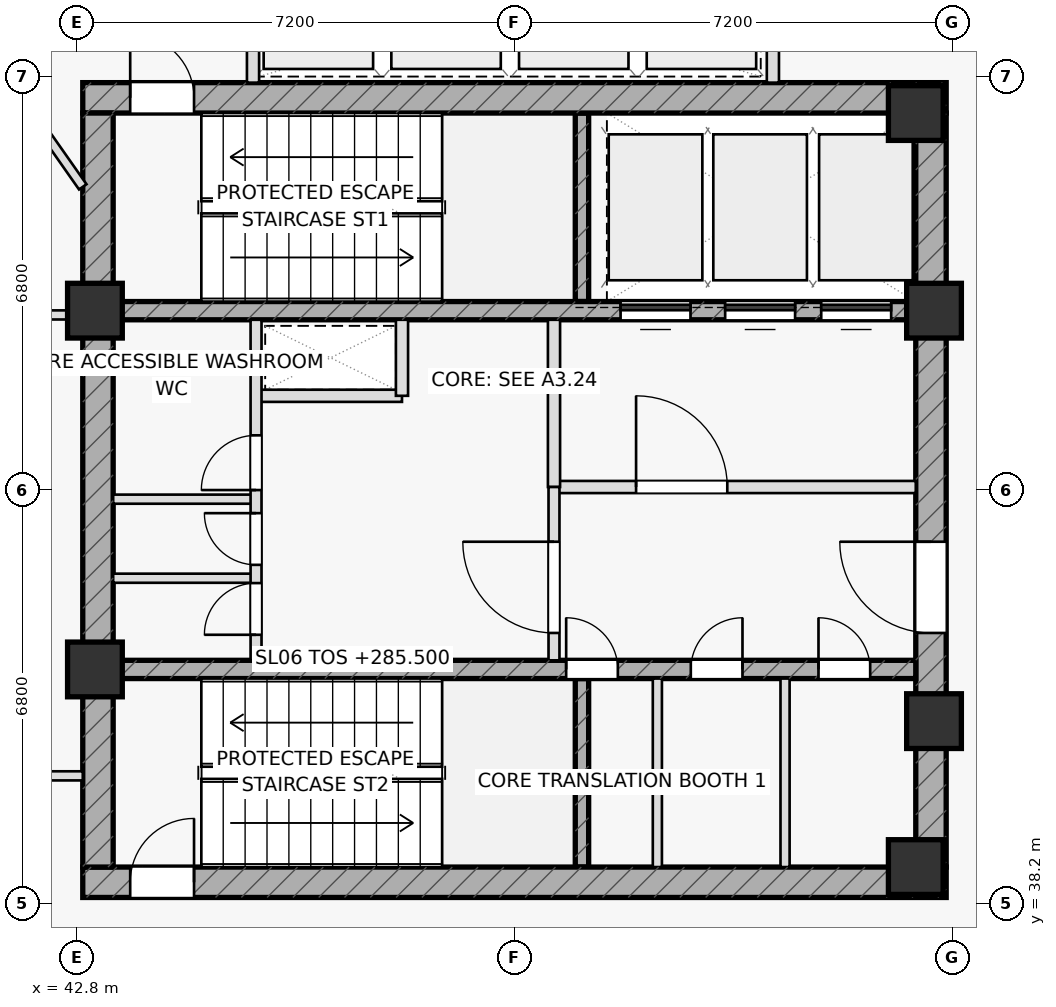
"""IFC4 building model, lengths in metres.
Left out: names, types, materials, properties, quantities, classifications, styles, units other than length and angle.
Written with IfcOpenShell. Run it as: python <this file> out.ifc"""

import sys

from ifc_helpers import new_model, si_unit, direction, frame, frame_2d, origin, origin_2d, place, context, subcontext, project, spatial, rectangle, extrude, element, fill, save


model = new_model("IFC4")
c1 = context("Model", 3, precision=1e-05, world=origin(), true_north=direction((0.0, 1.0)))
c2 = subcontext(c1, "Body", "Model", "MODEL_VIEW")
j1 = project(units=[si_unit("LENGTHUNIT", "METRE"), si_unit("PLANEANGLEUNIT", "RADIAN")], contexts=[c1])
p1 = place(None, origin())
s1 = spatial("IfcSite", under=j1, at=p1, CompositionType="ELEMENT")
p2 = place(p1, origin())
s2 = spatial("IfcBuilding", under=s1, at=p2, CompositionType="ELEMENT")
p3 = place(p2, frame((0.0, 0.0, 285.5)))
s3 = spatial("IfcBuildingStorey", under=s2, at=p3, CompositionType="ELEMENT", Elevation=285.5)
for number, where, z_axis, x_axis in (
    (1, (51.11, 48.1, 0.0), (0.0, 0.0, 1.0), (0.0, 1.0, 0.0)),
    (2, (51.11, 38.8, 0.0), (0.0, 0.0, 1.0), (0.0, 1.0, 0.0)),
):
    element("IfcWall", number, at=place(p3, frame(where, z_axis=z_axis, x_axis=x_axis)), inside=s3, PredefinedType="SHEAR", context=c2, shape_type="SweptSolid", body=[
        extrude(rectangle(XDim=3.1, YDim=0.22, at=frame_2d((1.55, 0.0))), origin(), (0.0, 0.0, 1.0), 3.7),
    ])
p4 = place(p3, frame((42.9, 51.45, 0.0), z_axis=(0.0, 0.0, 1.0), x_axis=(1.0, 0.0, 0.0)))
e3 = element("IfcWall", 3, at=p4, inside=s3, PredefinedType="SHEAR", context=c2, shape_type="SweptSolid", body=[
    extrude(rectangle(XDim=14.2, YDim=0.5, at=frame_2d((7.1, 0.0))), origin(), (0.0, 0.0, 1.0), 3.7),
])
p5 = place(p4, frame((0.78, 0.0, 0.0)))
e4 = element("IfcOpeningElement", 4, at=p5, cuts=e3, PredefinedType="OPENING", context=c2, shape_type="SweptSolid", body=[
    extrude(rectangle(XDim=1.05, YDim=2.2, at=frame_2d((0.525, 1.1))), frame((0.0, 0.26, 0.0), z_axis=(0.0, -1.0, 0.0), x_axis=(1.0, 0.0, 0.0)), (0.0, 0.0, 1.0), 0.52),
])
p6 = place(p3, frame((42.9, 38.55, 0.0), z_axis=(0.0, 0.0, 1.0), x_axis=(1.0, 0.0, 0.0)))
e5 = element("IfcWall", 5, at=p6, inside=s3, PredefinedType="SHEAR", context=c2, shape_type="SweptSolid", body=[
    extrude(rectangle(XDim=14.2, YDim=0.5, at=frame_2d((7.1, 0.0))), origin(), (0.0, 0.0, 1.0), 3.7),
])
p7 = place(p6, frame((0.78, 0.0, 0.0)))
e6 = element("IfcOpeningElement", 6, at=p7, cuts=e5, PredefinedType="OPENING", context=c2, shape_type="SweptSolid", body=[
    extrude(rectangle(XDim=1.05, YDim=2.2, at=frame_2d((0.525, 1.1))), frame((0.0, 0.26, 0.0), z_axis=(0.0, -1.0, 0.0), x_axis=(1.0, 0.0, 0.0)), (0.0, 0.0, 1.0), 0.52),
])
p8 = place(p3, frame((43.15, 38.8, 0.0), z_axis=(0.0, 0.0, 1.0), x_axis=(0.0, 1.0, 0.0)))
e7 = element("IfcWall", 7, at=p8, inside=s3, PredefinedType="SHEAR", context=c2, shape_type="SweptSolid", body=[
    extrude(rectangle(XDim=12.4, YDim=0.5, at=frame_2d((6.2, 0.0))), origin(), (0.0, 0.0, 1.0), 3.7),
])
p9 = place(p3, frame((56.85, 38.8, 0.0), z_axis=(0.0, 0.0, 1.0), x_axis=(0.0, 1.0, 0.0)))
e8 = element("IfcWall", 8, at=p9, inside=s3, PredefinedType="SHEAR", context=c2, shape_type="SweptSolid", body=[
    extrude(rectangle(XDim=12.4, YDim=0.5, at=frame_2d((6.2, 0.0))), origin(), (0.0, 0.0, 1.0), 3.7),
])
p10 = place(p9, frame((3.85, 0.0, 0.0)))
e9 = element("IfcOpeningElement", 9, at=p10, cuts=e8, PredefinedType="OPENING", context=c2, shape_type="SweptSolid", body=[
    extrude(rectangle(XDim=1.5, YDim=2.2, at=frame_2d((0.75, 1.1))), frame((0.0, 0.26, 0.0), z_axis=(0.0, -1.0, 0.0), x_axis=(1.0, 0.0, 0.0)), (0.0, 0.0, 1.0), 0.52),
])
p11 = place(p3, frame((43.4, 47.95, 0.0), z_axis=(0.0, 0.0, 1.0), x_axis=(1.0, 0.0, 0.0)))
e10 = element("IfcWall", 10, at=p11, inside=s3, PredefinedType="SHEAR", context=c2, shape_type="SweptSolid", body=[
    extrude(rectangle(XDim=13.2, YDim=0.3, at=frame_2d((6.6, 0.0))), origin(), (0.0, 0.0, 1.0), 3.7),
])
p12 = place(p11, frame((8.345, 0.0, 0.0)))
e11 = element("IfcOpeningElement", 11, at=p12, cuts=e10, PredefinedType="OPENING", context=c2, shape_type="SweptSolid", body=[
    extrude(rectangle(XDim=1.15, YDim=2.2, at=frame_2d((0.575, 1.1))), frame((0.0, 0.16, 0.0), z_axis=(0.0, -1.0, 0.0), x_axis=(1.0, 0.0, 0.0)), (0.0, 0.0, 1.0), 0.32),
])
p13 = place(p11, frame((10.065, 0.0, 0.0)))
e12 = element("IfcOpeningElement", 12, at=p13, cuts=e10, PredefinedType="OPENING", context=c2, shape_type="SweptSolid", body=[
    extrude(rectangle(XDim=1.15, YDim=2.2, at=frame_2d((0.575, 1.1))), frame((0.0, 0.16, 0.0), z_axis=(0.0, -1.0, 0.0), x_axis=(1.0, 0.0, 0.0)), (0.0, 0.0, 1.0), 0.32),
])
p14 = place(p11, frame((11.645, 0.0, 0.0)))
e13 = element("IfcOpeningElement", 13, at=p14, cuts=e10, PredefinedType="OPENING", context=c2, shape_type="SweptSolid", body=[
    extrude(rectangle(XDim=1.15, YDim=2.2, at=frame_2d((0.575, 1.1))), frame((0.0, 0.16, 0.0), z_axis=(0.0, -1.0, 0.0), x_axis=(1.0, 0.0, 0.0)), (0.0, 0.0, 1.0), 0.32),
])
p15 = place(p3, frame((43.4, 42.05, 0.0), z_axis=(0.0, 0.0, 1.0), x_axis=(1.0, 0.0, 0.0)))
e14 = element("IfcWall", 14, at=p15, inside=s3, PredefinedType="SHEAR", context=c2, shape_type="SweptSolid", body=[
    extrude(rectangle(XDim=13.2, YDim=0.3, at=frame_2d((6.6, 0.0))), origin(), (0.0, 0.0, 1.0), 3.7),
])
p16 = place(p15, frame((7.45, 0.0, 0.0)))
e15 = element("IfcOpeningElement", 15, at=p16, cuts=e14, PredefinedType="OPENING", context=c2, shape_type="SweptSolid", body=[
    extrude(rectangle(XDim=0.85, YDim=2.05, at=frame_2d((0.425, 1.025))), frame((0.0, 0.16, 0.0), z_axis=(0.0, -1.0, 0.0), x_axis=(1.0, 0.0, 0.0)), (0.0, 0.0, 1.0), 0.32),
])
p17 = place(p15, frame((9.5, 0.0, 0.0)))
e16 = element("IfcOpeningElement", 16, at=p17, cuts=e14, PredefinedType="OPENING", context=c2, shape_type="SweptSolid", body=[
    extrude(rectangle(XDim=0.85, YDim=2.05, at=frame_2d((0.425, 1.025))), frame((0.0, 0.16, 0.0), z_axis=(0.0, -1.0, 0.0), x_axis=(1.0, 0.0, 0.0)), (0.0, 0.0, 1.0), 0.32),
])
p18 = place(p15, frame((11.6, 0.0, 0.0)))
e17 = element("IfcOpeningElement", 17, at=p18, cuts=e14, PredefinedType="OPENING", context=c2, shape_type="SweptSolid", body=[
    extrude(rectangle(XDim=0.85, YDim=2.05, at=frame_2d((0.425, 1.025))), frame((0.0, 0.16, 0.0), z_axis=(0.0, -1.0, 0.0), x_axis=(1.0, 0.0, 0.0)), (0.0, 0.0, 1.0), 0.32),
])
for number, where, z_axis, x_axis in (
    (18, (43.1, 47.95, 0.0), (0.0, 0.0, 1.0), (1.0, 0.0, 0.0)),
    (19, (56.9, 47.95, 0.0), (0.0, 0.0, 1.0), (1.0, 0.0, 0.0)),
    (20, (56.6, 51.2, 0.0), (0.0, 0.0, 1.0), (1.0, 0.0, 0.0)),
    (21, (43.1, 42.05, 0.0), (0.0, 0.0, 1.0), (1.0, 0.0, 0.0)),
    (22, (56.9, 41.2, 0.0), (0.0, 0.0, 1.0), (1.0, 0.0, 0.0)),
    (23, (56.6, 38.8, 0.0), (0.0, 0.0, 1.0), (1.0, 0.0, 0.0)),
):
    element("IfcColumn", number, at=place(p3, frame(where, z_axis=z_axis, x_axis=x_axis)), inside=s3, PredefinedType="COLUMN", context=c2, shape_type="SweptSolid", body=[
        extrude(rectangle(XDim=0.9, YDim=0.9, at=origin_2d()), origin(), (0.0, 0.0, 1.0), 3.7),
    ])
for number, where, z_axis, x_axis in (
    (24, (45.7, 51.7, 0.0), (0.0, 0.0, 1.0), (0.0, 1.0, 0.0)),
    (25, (54.25, 51.7, 0.0), (0.0, 0.0, 1.0), (0.0, 1.0, 0.0)),
):
    element("IfcWall", number, at=place(p3, frame(where, z_axis=z_axis, x_axis=x_axis)), inside=s3, PredefinedType="PARTITIONING", context=c2, shape_type="SweptSolid", body=[
        extrude(rectangle(XDim=2.6, YDim=0.2, at=frame_2d((1.3, 0.0))), origin(), (0.0, 0.0, 1.0), 3.7),
    ])
p19 = place(p3, frame((45.75, 46.55, 0.0), z_axis=(0.0, 0.0, 1.0), x_axis=(1.0, 0.0, 0.0)))
e26 = element("IfcWall", 26, at=p19, inside=s3, PredefinedType="PARTITIONING", context=c2, shape_type="SweptSolid", body=[
    extrude(rectangle(XDim=2.4, YDim=0.2, at=frame_2d((1.2, 0.0))), origin(), (0.0, 0.0, 1.0), 3.7),
])
p20 = place(p3, frame((48.15, 46.55, 0.0), z_axis=(0.0, 0.0, 1.0), x_axis=(0.0, 1.0, 0.0)))
e27 = element("IfcWall", 27, at=p20, inside=s3, PredefinedType="PARTITIONING", context=c2, shape_type="SweptSolid", body=[
    extrude(rectangle(XDim=1.25, YDim=0.2, at=frame_2d((0.625, 0.0))), origin(), (0.0, 0.0, 1.0), 3.7),
])
p21 = place(p3, frame((50.65, 45.05, 0.0), z_axis=(0.0, 0.0, 1.0), x_axis=(1.0, 0.0, 0.0)))
e28 = element("IfcWall", 28, at=p21, inside=s3, PredefinedType="PARTITIONING", context=c2, shape_type="SweptSolid", body=[
    extrude(rectangle(XDim=5.95, YDim=0.2, at=frame_2d((2.975, 0.0))), origin(), (0.0, 0.0, 1.0), 3.7),
])
p22 = place(p21, frame((1.35, 0.0, 0.0)))
e29 = element("IfcOpeningElement", 29, at=p22, cuts=e28, PredefinedType="OPENING", context=c2, shape_type="SweptSolid", body=[
    extrude(rectangle(XDim=1.5, YDim=2.2, at=frame_2d((0.75, 1.1))), frame((0.0, 0.11, 0.0), z_axis=(0.0, -1.0, 0.0), x_axis=(1.0, 0.0, 0.0)), (0.0, 0.0, 1.0), 0.22),
])
p23 = place(p3, frame((50.65, 45.05, 0.0), z_axis=(0.0, 0.0, 1.0), x_axis=(0.0, 1.0, 0.0)))
e30 = element("IfcWall", 30, at=p23, inside=s3, PredefinedType="PARTITIONING", context=c2, shape_type="SweptSolid", body=[
    extrude(rectangle(XDim=2.75, YDim=0.2, at=frame_2d((1.375, 0.0))), origin(), (0.0, 0.0, 1.0), 3.7),
])
p24 = place(p3, frame((50.65, 42.2, 0.0), z_axis=(0.0, 0.0, 1.0), x_axis=(0.0, 1.0, 0.0)))
e31 = element("IfcWall", 31, at=p24, inside=s3, PredefinedType="PARTITIONING", context=c2, shape_type="SweptSolid", body=[
    extrude(rectangle(XDim=2.85, YDim=0.18, at=frame_2d((1.425, 0.0))), origin(), (0.0, 0.0, 1.0), 3.7),
])
p25 = place(p24, frame((0.45, 0.0, 0.0)))
e32 = element("IfcOpeningElement", 32, at=p25, cuts=e31, PredefinedType="OPENING", context=c2, shape_type="SweptSolid", body=[
    extrude(rectangle(XDim=1.5, YDim=2.2, at=frame_2d((0.75, 1.1))), frame((0.0, 0.1, 0.0), z_axis=(0.0, -1.0, 0.0), x_axis=(1.0, 0.0, 0.0)), (0.0, 0.0, 1.0), 0.2),
])
for number, where, z_axis, x_axis in (
    (33, (52.35, 38.8, 0.0), (0.0, 0.0, 1.0), (0.0, 1.0, 0.0)),
    (34, (54.45, 38.8, 0.0), (0.0, 0.0, 1.0), (0.0, 1.0, 0.0)),
):
    element("IfcWall", number, at=place(p3, frame(where, z_axis=z_axis, x_axis=x_axis)), inside=s3, PredefinedType="PARTITIONING", context=c2, shape_type="SweptSolid", body=[
        extrude(rectangle(XDim=3.1, YDim=0.15, at=frame_2d((1.55, 0.0))), origin(), (0.0, 0.0, 1.0), 3.7),
    ])
for number, where, z_axis, x_axis in (
    (35, (43.4, 43.55, 0.0), (0.0, 0.0, 1.0), (1.0, 0.0, 0.0)),
    (36, (43.4, 44.85, 0.0), (0.0, 0.0, 1.0), (1.0, 0.0, 0.0)),
):
    element("IfcWall", number, at=place(p3, frame(where, z_axis=z_axis, x_axis=x_axis)), inside=s3, PredefinedType="PARTITIONING", context=c2, shape_type="SweptSolid", body=[
        extrude(rectangle(XDim=2.35, YDim=0.15, at=frame_2d((1.175, 0.0))), origin(), (0.0, 0.0, 1.0), 3.7),
    ])
p26 = place(p3, frame((45.75, 42.2, 0.0), z_axis=(0.0, 0.0, 1.0), x_axis=(0.0, 1.0, 0.0)))
e37 = element("IfcWall", 37, at=p26, inside=s3, PredefinedType="PARTITIONING", context=c2, shape_type="SweptSolid", body=[
    extrude(rectangle(XDim=5.6, YDim=0.18, at=frame_2d((2.8, 0.0))), origin(), (0.0, 0.0, 1.0), 3.7),
])
p27 = place(p26, frame((0.42, 0.0, 0.0)))
e38 = element("IfcOpeningElement", 38, at=p27, cuts=e37, PredefinedType="OPENING", context=c2, shape_type="SweptSolid", body=[
    extrude(rectangle(XDim=0.85, YDim=2.05, at=frame_2d((0.425, 1.025))), frame((0.0, 0.1, 0.0), z_axis=(0.0, -1.0, 0.0), x_axis=(1.0, 0.0, 0.0)), (0.0, 0.0, 1.0), 0.2),
])
p28 = place(p26, frame((1.57, 0.0, 0.0)))
e39 = element("IfcOpeningElement", 39, at=p28, cuts=e37, PredefinedType="OPENING", context=c2, shape_type="SweptSolid", body=[
    extrude(rectangle(XDim=0.85, YDim=2.05, at=frame_2d((0.425, 1.025))), frame((0.0, 0.1, 0.0), z_axis=(0.0, -1.0, 0.0), x_axis=(1.0, 0.0, 0.0)), (0.0, 0.0, 1.0), 0.2),
])
p29 = place(p26, frame((2.8, 0.0, 0.0)))
e40 = element("IfcOpeningElement", 40, at=p29, cuts=e37, PredefinedType="OPENING", context=c2, shape_type="SweptSolid", body=[
    extrude(rectangle(XDim=0.9, YDim=2.05, at=frame_2d((0.45, 1.025))), frame((0.0, 0.1, 0.0), z_axis=(0.0, -1.0, 0.0), x_axis=(1.0, 0.0, 0.0)), (0.0, 0.0, 1.0), 0.2),
])
p30 = place(p3, frame((37.14, 40.3, 0.0), z_axis=(0.0, 0.0, 1.0), x_axis=(1.0, 0.0, 0.0)))
e41 = element("IfcWall", 41, at=p30, inside=s3, PredefinedType="PARTITIONING", context=c2, shape_type="SweptSolid", body=[
    extrude(rectangle(XDim=5.76, YDim=0.15, at=frame_2d((2.88, 0.0))), origin(), (0.0, 0.0, 1.0), 3.175),
])
p31 = place(p30, frame((3.21, 0.0, 0.0)))
e42 = element("IfcOpeningElement", 42, at=p31, cuts=e41, PredefinedType="OPENING", context=c2, shape_type="SweptSolid", body=[
    extrude(rectangle(XDim=0.95, YDim=2.05, at=frame_2d((0.475, 1.025))), frame((0.0, 0.085, 0.0), z_axis=(0.0, -1.0, 0.0), x_axis=(1.0, 0.0, 0.0)), (0.0, 0.0, 1.0), 0.17),
])
p32 = place(p3, frame((37.14, 47.88, 0.0), z_axis=(0.0, 0.0, 1.0), x_axis=(1.0, 0.0, 0.0)))
e43 = element("IfcWall", 43, at=p32, inside=s3, PredefinedType="PARTITIONING", context=c2, shape_type="SweptSolid", body=[
    extrude(rectangle(XDim=5.76, YDim=0.15, at=frame_2d((2.88, 0.0))), origin(), (0.0, 0.0, 1.0), 3.7),
])
p33 = place(p3, frame((42.9, 49.986, 0.0), z_axis=(0.0, 0.0, 1.0), x_axis=(-0.574534288992, 0.818480513373, 0.0)))
e44 = element("IfcWall", 44, at=p33, inside=s3, PredefinedType="PARTITIONING", context=c2, shape_type="SweptSolid", body=[
    extrude(rectangle(XDim=14.912, YDim=0.15, at=frame_2d((7.456, 0.0))), origin(), (0.0, 0.0, 1.0), 3.175),
])
p34 = place(p33, frame((1.35, 0.0, 0.0)))
e45 = element("IfcOpeningElement", 45, at=p34, cuts=e44, PredefinedType="OPENING", context=c2, shape_type="SweptSolid", body=[
    extrude(rectangle(XDim=0.95, YDim=2.05, at=frame_2d((0.475, 1.025))), frame((0.0, 0.085, 0.0), z_axis=(0.0, -1.0, 0.0), x_axis=(1.0, 0.0, 0.0)), (0.0, 0.0, 1.0), 0.17),
])
p35 = place(p5, origin())
e46 = element("IfcDoor", 46, at=p35, inside=s3, OperationType="SINGLE_SWING_LEFT", PredefinedType="DOOR", context=c2, shape_type="SweptSolid", body=[
    extrude(rectangle(XDim=1.05, YDim=2.2, at=frame_2d((0.525, 1.1))), frame((0.0, 0.025, 0.0), z_axis=(0.0, -1.0, 0.0), x_axis=(1.0, 0.0, 0.0)), (0.0, 0.0, 1.0), 0.05),
])
fill(e4, e46)
p36 = place(p7, origin())
e47 = element("IfcDoor", 47, at=p36, inside=s3, OperationType="SINGLE_SWING_RIGHT", PredefinedType="DOOR", context=c2, shape_type="SweptSolid", body=[
    extrude(rectangle(XDim=1.05, YDim=2.2, at=frame_2d((0.525, 1.1))), frame((0.0, 0.025, 0.0), z_axis=(0.0, -1.0, 0.0), x_axis=(1.0, 0.0, 0.0)), (0.0, 0.0, 1.0), 0.05),
])
fill(e6, e47)
p37 = place(p10, origin())
e48 = element("IfcDoor", 48, at=p37, inside=s3, OperationType="SINGLE_SWING_RIGHT", PredefinedType="DOOR", context=c2, shape_type="SweptSolid", body=[
    extrude(rectangle(XDim=1.5, YDim=2.2, at=frame_2d((0.75, 1.1))), frame((0.0, 0.025, 0.0), z_axis=(0.0, -1.0, 0.0), x_axis=(1.0, 0.0, 0.0)), (0.0, 0.0, 1.0), 0.05),
])
fill(e9, e48)
p38 = place(p22, origin())
e49 = element("IfcDoor", 49, at=p38, inside=s3, OperationType="SINGLE_SWING_LEFT", PredefinedType="DOOR", context=c2, shape_type="SweptSolid", body=[
    extrude(rectangle(XDim=1.5, YDim=2.2, at=frame_2d((0.75, 1.1))), frame((0.0, 0.025, 0.0), z_axis=(0.0, -1.0, 0.0), x_axis=(1.0, 0.0, 0.0)), (0.0, 0.0, 1.0), 0.05),
])
fill(e29, e49)
p39 = place(p25, origin())
e50 = element("IfcDoor", 50, at=p39, inside=s3, OperationType="SINGLE_SWING_RIGHT", PredefinedType="DOOR", context=c2, shape_type="SweptSolid", body=[
    extrude(rectangle(XDim=1.5, YDim=2.2, at=frame_2d((0.75, 1.1))), frame((0.0, 0.025, 0.0), z_axis=(0.0, -1.0, 0.0), x_axis=(1.0, 0.0, 0.0)), (0.0, 0.0, 1.0), 0.05),
])
fill(e32, e50)
p40 = place(p16, origin())
e51 = element("IfcDoor", 51, at=p40, inside=s3, OperationType="SINGLE_SWING_LEFT", PredefinedType="DOOR", context=c2, shape_type="SweptSolid", body=[
    extrude(rectangle(XDim=0.85, YDim=2.05, at=frame_2d((0.425, 1.025))), frame((0.0, 0.025, 0.0), z_axis=(0.0, -1.0, 0.0), x_axis=(1.0, 0.0, 0.0)), (0.0, 0.0, 1.0), 0.05),
])
fill(e15, e51)
p41 = place(p17, origin())
e52 = element("IfcDoor", 52, at=p41, inside=s3, OperationType="SINGLE_SWING_RIGHT", PredefinedType="DOOR", context=c2, shape_type="SweptSolid", body=[
    extrude(rectangle(XDim=0.85, YDim=2.05, at=frame_2d((0.425, 1.025))), frame((0.0, 0.025, 0.0), z_axis=(0.0, -1.0, 0.0), x_axis=(1.0, 0.0, 0.0)), (0.0, 0.0, 1.0), 0.05),
])
fill(e16, e52)
p42 = place(p18, origin())
e53 = element("IfcDoor", 53, at=p42, inside=s3, OperationType="SINGLE_SWING_LEFT", PredefinedType="DOOR", context=c2, shape_type="SweptSolid", body=[
    extrude(rectangle(XDim=0.85, YDim=2.05, at=frame_2d((0.425, 1.025))), frame((0.0, 0.025, 0.0), z_axis=(0.0, -1.0, 0.0), x_axis=(1.0, 0.0, 0.0)), (0.0, 0.0, 1.0), 0.05),
])
fill(e17, e53)
p43 = place(p27, origin())
e54 = element("IfcDoor", 54, at=p43, inside=s3, OperationType="SINGLE_SWING_LEFT", PredefinedType="DOOR", context=c2, shape_type="SweptSolid", body=[
    extrude(rectangle(XDim=0.85, YDim=2.05, at=frame_2d((0.425, 1.025))), frame((0.0, 0.025, 0.0), z_axis=(0.0, -1.0, 0.0), x_axis=(1.0, 0.0, 0.0)), (0.0, 0.0, 1.0), 0.05),
])
fill(e38, e54)
p44 = place(p28, origin())
e55 = element("IfcDoor", 55, at=p44, inside=s3, OperationType="SINGLE_SWING_RIGHT", PredefinedType="DOOR", context=c2, shape_type="SweptSolid", body=[
    extrude(rectangle(XDim=0.85, YDim=2.05, at=frame_2d((0.425, 1.025))), frame((0.0, 0.025, 0.0), z_axis=(0.0, -1.0, 0.0), x_axis=(1.0, 0.0, 0.0)), (0.0, 0.0, 1.0), 0.05),
])
fill(e39, e55)
p45 = place(p29, origin())
e56 = element("IfcDoor", 56, at=p45, inside=s3, OperationType="SINGLE_SWING_LEFT", PredefinedType="DOOR", context=c2, shape_type="SweptSolid", body=[
    extrude(rectangle(XDim=0.9, YDim=2.05, at=frame_2d((0.45, 1.025))), frame((0.0, 0.025, 0.0), z_axis=(0.0, -1.0, 0.0), x_axis=(1.0, 0.0, 0.0)), (0.0, 0.0, 1.0), 0.05),
])
fill(e40, e56)
p46 = place(p12, origin())
e57 = element("IfcDoor", 57, at=p46, inside=s3, OperationType="SLIDING_TO_LEFT", PredefinedType="DOOR", context=c2, shape_type="SweptSolid", body=[
    extrude(rectangle(XDim=1.15, YDim=2.2, at=frame_2d((0.575, 1.1))), frame((0.0, 0.025, 0.0), z_axis=(0.0, -1.0, 0.0), x_axis=(1.0, 0.0, 0.0)), (0.0, 0.0, 1.0), 0.05),
])
fill(e11, e57)
p47 = place(p13, origin())
e58 = element("IfcDoor", 58, at=p47, inside=s3, OperationType="SLIDING_TO_LEFT", PredefinedType="DOOR", context=c2, shape_type="SweptSolid", body=[
    extrude(rectangle(XDim=1.15, YDim=2.2, at=frame_2d((0.575, 1.1))), frame((0.0, 0.025, 0.0), z_axis=(0.0, -1.0, 0.0), x_axis=(1.0, 0.0, 0.0)), (0.0, 0.0, 1.0), 0.05),
])
fill(e12, e58)
p48 = place(p14, origin())
e59 = element("IfcDoor", 59, at=p48, inside=s3, OperationType="SLIDING_TO_LEFT", PredefinedType="DOOR", context=c2, shape_type="SweptSolid", body=[
    extrude(rectangle(XDim=1.15, YDim=2.2, at=frame_2d((0.575, 1.1))), frame((0.0, 0.025, 0.0), z_axis=(0.0, -1.0, 0.0), x_axis=(1.0, 0.0, 0.0)), (0.0, 0.0, 1.0), 0.05),
])
fill(e13, e59)
save(model, sys.argv[1])
